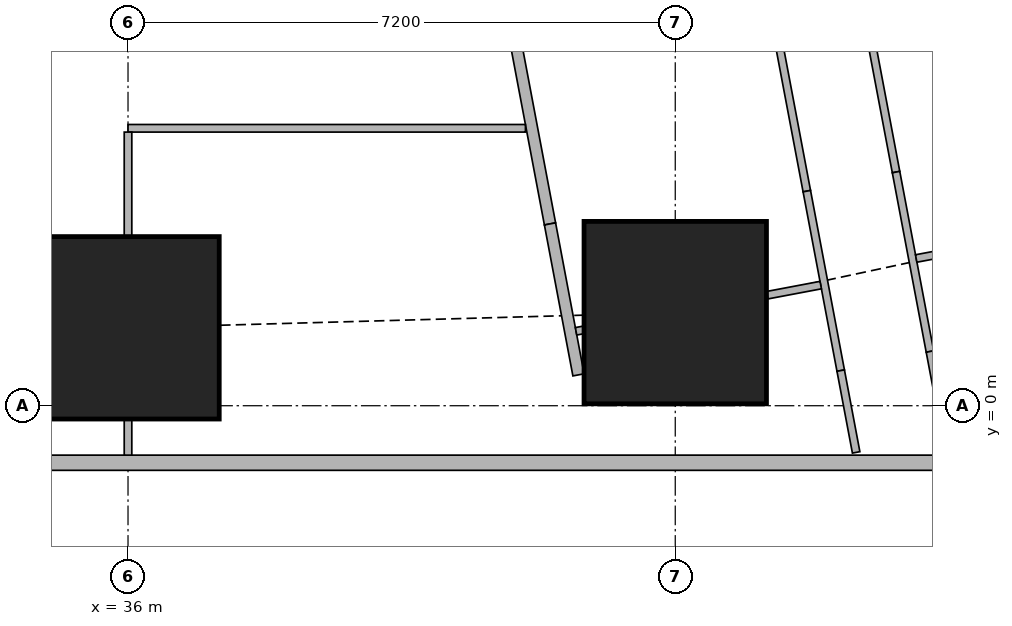
"""IFC4 building model, lengths in metres.
Left out: names, types, materials, properties, quantities, classifications, styles, units other than length and angle.
Written with IfcOpenShell. Run it as: python <this file> out.ifc"""

import sys

from ifc_helpers import new_model, si_unit, direction, frame, frame_2d, origin, origin_2d, place, context, subcontext, project, spatial, rectangle, extrude, element, fill, save


model = new_model("IFC4")
c1 = context("Model", 3, precision=1e-05, world=origin(), true_north=direction((0.0, 1.0)))
c2 = subcontext(c1, "Body", "Model", "MODEL_VIEW")
j1 = project(units=[si_unit("LENGTHUNIT", "METRE"), si_unit("PLANEANGLEUNIT", "RADIAN")], contexts=[c1])
p1 = place(None, origin())
s1 = spatial("IfcSite", under=j1, at=p1, CompositionType="ELEMENT")
p2 = place(p1, origin())
s2 = spatial("IfcBuilding", under=s1, at=p2, CompositionType="ELEMENT")
p3 = place(p2, frame((0.0, 0.0, 216.2)))
s3 = spatial("IfcBuildingStorey", under=s2, at=p3, CompositionType="ELEMENT", Elevation=216.2)
for number, where, z_axis, x_axis in (
    (1, (36.0, 1.025, 0.0), (0.0, 0.0, 1.0), (1.0, 0.0, 0.0)),
    (2, (43.2, 1.225, 0.0), (0.0, 0.0, 1.0), (1.0, 0.0, 0.0)),
):
    element("IfcColumn", number, at=place(p3, frame(where, z_axis=z_axis, x_axis=x_axis)), inside=s3, PredefinedType="COLUMN", context=c2, shape_type="SweptSolid", body=[
        extrude(rectangle(XDim=2.4, YDim=2.4, at=origin_2d()), origin(), (0.0, 0.0, 1.0), 3.75),
    ])
p4 = place(p3, frame((7.363, -0.75, 0.0), z_axis=(0.0, 0.0, 1.0), x_axis=(1.0, 0.0, 0.0)))
e3 = element("IfcWall", 3, at=p4, inside=s3, PredefinedType="SOLIDWALL", context=c2, shape_type="SweptSolid", body=[
    extrude(rectangle(XDim=40.428, YDim=0.2, at=frame_2d((20.214, 0.0))), origin(), (0.0, 0.0, 1.0), 3.5),
])
p5 = place(p4, frame((2.319, 0.0, 0.9)))
e4 = element("IfcOpeningElement", 4, at=p5, cuts=e3, PredefinedType="OPENING", context=c2, shape_type="SweptSolid", body=[
    extrude(rectangle(XDim=2.4, YDim=1.5, at=frame_2d((1.2, 0.75))), frame((0.0, 0.11, 0.0), z_axis=(0.0, -1.0, 0.0), x_axis=(1.0, 0.0, 0.0)), (0.0, 0.0, 1.0), 0.22),
])
p6 = place(p4, frame((7.937, 0.0, 0.9)))
e5 = element("IfcOpeningElement", 5, at=p6, cuts=e3, PredefinedType="OPENING", context=c2, shape_type="SweptSolid", body=[
    extrude(rectangle(XDim=1.8, YDim=1.5, at=frame_2d((0.9, 0.75))), frame((0.0, 0.11, 0.0), z_axis=(0.0, -1.0, 0.0), x_axis=(1.0, 0.0, 0.0)), (0.0, 0.0, 1.0), 0.22),
])
p7 = place(p4, frame((11.537, 0.0, 0.9)))
e6 = element("IfcOpeningElement", 6, at=p7, cuts=e3, PredefinedType="OPENING", context=c2, shape_type="SweptSolid", body=[
    extrude(rectangle(XDim=1.8, YDim=1.5, at=frame_2d((0.9, 0.75))), frame((0.0, 0.11, 0.0), z_axis=(0.0, -1.0, 0.0), x_axis=(1.0, 0.0, 0.0)), (0.0, 0.0, 1.0), 0.22),
])
p8 = place(p4, frame((15.137, 0.0, 0.9)))
e7 = element("IfcOpeningElement", 7, at=p8, cuts=e3, PredefinedType="OPENING", context=c2, shape_type="SweptSolid", body=[
    extrude(rectangle(XDim=1.8, YDim=1.5, at=frame_2d((0.9, 0.75))), frame((0.0, 0.11, 0.0), z_axis=(0.0, -1.0, 0.0), x_axis=(1.0, 0.0, 0.0)), (0.0, 0.0, 1.0), 0.22),
])
p9 = place(p4, frame((18.737, 0.0, 0.9)))
e8 = element("IfcOpeningElement", 8, at=p9, cuts=e3, PredefinedType="OPENING", context=c2, shape_type="SweptSolid", body=[
    extrude(rectangle(XDim=1.8, YDim=1.5, at=frame_2d((0.9, 0.75))), frame((0.0, 0.11, 0.0), z_axis=(0.0, -1.0, 0.0), x_axis=(1.0, 0.0, 0.0)), (0.0, 0.0, 1.0), 0.22),
])
p10 = place(p4, frame((22.337, 0.0, 0.9)))
e9 = element("IfcOpeningElement", 9, at=p10, cuts=e3, PredefinedType="OPENING", context=c2, shape_type="SweptSolid", body=[
    extrude(rectangle(XDim=1.8, YDim=1.5, at=frame_2d((0.9, 0.75))), frame((0.0, 0.11, 0.0), z_axis=(0.0, -1.0, 0.0), x_axis=(1.0, 0.0, 0.0)), (0.0, 0.0, 1.0), 0.22),
])
p11 = place(p4, frame((25.937, 0.0, 0.9)))
e10 = element("IfcOpeningElement", 10, at=p11, cuts=e3, PredefinedType="OPENING", context=c2, shape_type="SweptSolid", body=[
    extrude(rectangle(XDim=1.8, YDim=1.5, at=frame_2d((0.9, 0.75))), frame((0.0, 0.11, 0.0), z_axis=(0.0, -1.0, 0.0), x_axis=(1.0, 0.0, 0.0)), (0.0, 0.0, 1.0), 0.22),
])
p12 = place(p4, frame((29.537, 0.0, 0.9)))
e11 = element("IfcOpeningElement", 11, at=p12, cuts=e3, PredefinedType="OPENING", context=c2, shape_type="SweptSolid", body=[
    extrude(rectangle(XDim=1.8, YDim=1.5, at=frame_2d((0.9, 0.75))), frame((0.0, 0.11, 0.0), z_axis=(0.0, -1.0, 0.0), x_axis=(1.0, 0.0, 0.0)), (0.0, 0.0, 1.0), 0.22),
])
p13 = place(p4, frame((33.137, 0.0, 0.9)))
e12 = element("IfcOpeningElement", 12, at=p13, cuts=e3, PredefinedType="OPENING", context=c2, shape_type="SweptSolid", body=[
    extrude(rectangle(XDim=1.8, YDim=1.5, at=frame_2d((0.9, 0.75))), frame((0.0, 0.11, 0.0), z_axis=(0.0, -1.0, 0.0), x_axis=(1.0, 0.0, 0.0)), (0.0, 0.0, 1.0), 0.22),
])
p14 = place(p3, frame((50.653, 2.703, 0.0), z_axis=(0.0, 0.0, 1.0), x_axis=(-0.185612026696, 0.982623109613, 0.0)))
e13 = element("IfcWall", 13, at=p14, inside=s3, PredefinedType="SOLIDWALL", context=c2, shape_type="SweptSolid", body=[
    extrude(rectangle(XDim=41.393, YDim=0.2, at=frame_2d((20.697, 0.0))), origin(), (0.0, 0.0, 1.0), 3.5),
])
p15 = place(p14, frame((1.633, 0.0, 0.9)))
e14 = element("IfcOpeningElement", 14, at=p15, cuts=e13, PredefinedType="OPENING", context=c2, shape_type="SweptSolid", body=[
    extrude(rectangle(XDim=1.8, YDim=1.5, at=frame_2d((0.9, 0.75))), frame((0.0, 0.11, 0.0), z_axis=(0.0, -1.0, 0.0), x_axis=(1.0, 0.0, 0.0)), (0.0, 0.0, 1.0), 0.22),
])
p16 = place(p14, frame((6.032, 0.0, 0.9)))
e15 = element("IfcOpeningElement", 15, at=p16, cuts=e13, PredefinedType="OPENING", context=c2, shape_type="SweptSolid", body=[
    extrude(rectangle(XDim=1.8, YDim=1.5, at=frame_2d((0.9, 0.75))), frame((0.0, 0.11, 0.0), z_axis=(0.0, -1.0, 0.0), x_axis=(1.0, 0.0, 0.0)), (0.0, 0.0, 1.0), 0.22),
])
p17 = place(p14, frame((9.848, 0.0, 0.9)))
e16 = element("IfcOpeningElement", 16, at=p17, cuts=e13, PredefinedType="OPENING", context=c2, shape_type="SweptSolid", body=[
    extrude(rectangle(XDim=1.8, YDim=1.5, at=frame_2d((0.9, 0.75))), frame((0.0, 0.11, 0.0), z_axis=(0.0, -1.0, 0.0), x_axis=(1.0, 0.0, 0.0)), (0.0, 0.0, 1.0), 0.22),
])
p18 = place(p14, frame((13.664, 0.0, 0.9)))
e17 = element("IfcOpeningElement", 17, at=p18, cuts=e13, PredefinedType="OPENING", context=c2, shape_type="SweptSolid", body=[
    extrude(rectangle(XDim=1.8, YDim=1.5, at=frame_2d((0.9, 0.75))), frame((0.0, 0.11, 0.0), z_axis=(0.0, -1.0, 0.0), x_axis=(1.0, 0.0, 0.0)), (0.0, 0.0, 1.0), 0.22),
])
p19 = place(p14, frame((17.481, 0.0, 0.9)))
e18 = element("IfcOpeningElement", 18, at=p19, cuts=e13, PredefinedType="OPENING", context=c2, shape_type="SweptSolid", body=[
    extrude(rectangle(XDim=1.8, YDim=1.5, at=frame_2d((0.9, 0.75))), frame((0.0, 0.11, 0.0), z_axis=(0.0, -1.0, 0.0), x_axis=(1.0, 0.0, 0.0)), (0.0, 0.0, 1.0), 0.22),
])
p20 = place(p14, frame((21.297, 0.0, 0.9)))
e19 = element("IfcOpeningElement", 19, at=p20, cuts=e13, PredefinedType="OPENING", context=c2, shape_type="SweptSolid", body=[
    extrude(rectangle(XDim=1.8, YDim=1.5, at=frame_2d((0.9, 0.75))), frame((0.0, 0.11, 0.0), z_axis=(0.0, -1.0, 0.0), x_axis=(1.0, 0.0, 0.0)), (0.0, 0.0, 1.0), 0.22),
])
p21 = place(p14, frame((25.113, 0.0, 0.9)))
e20 = element("IfcOpeningElement", 20, at=p21, cuts=e13, PredefinedType="OPENING", context=c2, shape_type="SweptSolid", body=[
    extrude(rectangle(XDim=1.8, YDim=1.5, at=frame_2d((0.9, 0.75))), frame((0.0, 0.11, 0.0), z_axis=(0.0, -1.0, 0.0), x_axis=(1.0, 0.0, 0.0)), (0.0, 0.0, 1.0), 0.22),
])
p22 = place(p14, frame((28.93, 0.0, 0.9)))
e21 = element("IfcOpeningElement", 21, at=p22, cuts=e13, PredefinedType="OPENING", context=c2, shape_type="SweptSolid", body=[
    extrude(rectangle(XDim=1.8, YDim=1.5, at=frame_2d((0.9, 0.75))), frame((0.0, 0.11, 0.0), z_axis=(0.0, -1.0, 0.0), x_axis=(1.0, 0.0, 0.0)), (0.0, 0.0, 1.0), 0.22),
])
p23 = place(p14, frame((32.746, 0.0, 0.9)))
e22 = element("IfcOpeningElement", 22, at=p23, cuts=e13, PredefinedType="OPENING", context=c2, shape_type="SweptSolid", body=[
    extrude(rectangle(XDim=1.8, YDim=1.5, at=frame_2d((0.9, 0.75))), frame((0.0, 0.11, 0.0), z_axis=(0.0, -1.0, 0.0), x_axis=(1.0, 0.0, 0.0)), (0.0, 0.0, 1.0), 0.22),
])
p24 = place(p14, frame((36.481, 0.0, 0.9)))
e23 = element("IfcOpeningElement", 23, at=p24, cuts=e13, PredefinedType="OPENING", context=c2, shape_type="SweptSolid", body=[
    extrude(rectangle(XDim=1.8, YDim=1.5, at=frame_2d((0.9, 0.75))), frame((0.0, 0.11, 0.0), z_axis=(0.0, -1.0, 0.0), x_axis=(1.0, 0.0, 0.0)), (0.0, 0.0, 1.0), 0.22),
])
p25 = place(p3, frame((33.933, 42.73, 0.0), z_axis=(0.0, 0.0, 1.0), x_axis=(0.185595417643, -0.982626246825, 0.0)))
e24 = element("IfcWall", 24, at=p25, inside=s3, PredefinedType="SOLIDWALL", context=c2, shape_type="SweptSolid", body=[
    extrude(rectangle(XDim=41.051, YDim=0.15, at=frame_2d((20.525, 0.0))), origin(), (0.0, 0.0, 1.0), 2.5),
])
p26 = place(p25, frame((12.266, 0.0, 0.0)))
e25 = element("IfcOpeningElement", 25, at=p26, cuts=e24, PredefinedType="OPENING", context=c2, shape_type="SweptSolid", body=[
    extrude(rectangle(XDim=1.0, YDim=2.1, at=frame_2d((0.5, 1.05))), frame((0.0, 0.085, 0.0), z_axis=(0.0, -1.0, 0.0), x_axis=(1.0, 0.0, 0.0)), (0.0, 0.0, 1.0), 0.17),
])
p27 = place(p25, frame((16.082, 0.0, 0.0)))
e26 = element("IfcOpeningElement", 26, at=p27, cuts=e24, PredefinedType="OPENING", context=c2, shape_type="SweptSolid", body=[
    extrude(rectangle(XDim=1.0, YDim=2.1, at=frame_2d((0.5, 1.05))), frame((0.0, 0.085, 0.0), z_axis=(0.0, -1.0, 0.0), x_axis=(1.0, 0.0, 0.0)), (0.0, 0.0, 1.0), 0.17),
])
p28 = place(p25, frame((24.369, 0.0, 0.0)))
e27 = element("IfcOpeningElement", 27, at=p28, cuts=e24, PredefinedType="OPENING", context=c2, shape_type="SweptSolid", body=[
    extrude(rectangle(XDim=1.0, YDim=2.1, at=frame_2d((0.5, 1.05))), frame((0.0, 0.085, 0.0), z_axis=(0.0, -1.0, 0.0), x_axis=(1.0, 0.0, 0.0)), (0.0, 0.0, 1.0), 0.17),
])
p29 = place(p25, frame((30.862, 0.0, 0.0)))
e28 = element("IfcOpeningElement", 28, at=p29, cuts=e24, PredefinedType="OPENING", context=c2, shape_type="SweptSolid", body=[
    extrude(rectangle(XDim=1.0, YDim=2.1, at=frame_2d((0.5, 1.05))), frame((0.0, 0.085, 0.0), z_axis=(0.0, -1.0, 0.0), x_axis=(1.0, 0.0, 0.0)), (0.0, 0.0, 1.0), 0.17),
])
p30 = place(p3, frame((41.552, 2.392, 0.0), z_axis=(0.0, 0.0, 1.0), x_axis=(0.185535500323, -0.982637561932, 0.0)))
e29 = element("IfcWall", 29, at=p30, inside=s3, PredefinedType="SOLIDWALL", context=c2, shape_type="SweptSolid", body=[
    extrude(rectangle(XDim=2.021, YDim=0.15, at=frame_2d((1.011, 0.0))), origin(), (0.0, 0.0, 1.0), 2.05),
])
p31 = place(p3, frame((41.229, 3.65, 0.0), z_axis=(0.0, 0.0, 1.0), x_axis=(-1.0, 0.0, 0.0)))
e30 = element("IfcWall", 30, at=p31, inside=s3, PredefinedType="PARTITIONING", context=c2, shape_type="SweptSolid", body=[
    extrude(rectangle(XDim=5.229, YDim=0.1, at=frame_2d((2.615, 0.0))), origin(), (0.0, 0.0, 1.0), 3.5),
])
p32 = place(p31, frame((4.129, 0.0, 0.0)))
e31 = element("IfcOpeningElement", 31, at=p32, cuts=e30, PredefinedType="OPENING", context=c2, shape_type="SweptSolid", body=[
    extrude(rectangle(XDim=0.9, YDim=2.1, at=frame_2d((0.45, 1.05))), frame((0.0, 0.06, 0.0), z_axis=(0.0, -1.0, 0.0), x_axis=(1.0, 0.0, 0.0)), (0.0, 0.0, 1.0), 0.12),
])
p33 = place(p3, frame((36.0, -0.65, 0.0), z_axis=(0.0, 0.0, 1.0), x_axis=(0.0, 1.0, 0.0)))
e32 = element("IfcWall", 32, at=p33, inside=s3, PredefinedType="PARTITIONING", context=c2, shape_type="SweptSolid", body=[
    extrude(rectangle(XDim=0.474, YDim=0.1, at=frame_2d((0.237, 0.0))), origin(), (0.0, 0.0, 1.0), 3.5),
])
p34 = place(p3, frame((36.0, 2.226, 0.0), z_axis=(0.0, 0.0, 1.0), x_axis=(0.0, 1.0, 0.0)))
e33 = element("IfcWall", 33, at=p34, inside=s3, PredefinedType="PARTITIONING", context=c2, shape_type="SweptSolid", body=[
    extrude(rectangle(XDim=1.374, YDim=0.1, at=frame_2d((0.687, 0.0))), origin(), (0.0, 0.0, 1.0), 3.5),
])
p35 = place(p3, frame((44.727, 10.366, 0.0), z_axis=(0.0, 0.0, 1.0), x_axis=(0.185678775129, -0.982610498858, 0.0)))
e34 = element("IfcWall", 34, at=p35, inside=s3, PredefinedType="PARTITIONING", context=c2, shape_type="SweptSolid", body=[
    extrude(rectangle(XDim=7.421, YDim=0.1, at=frame_2d((3.71, 0.0))), origin(), (0.0, 0.0, 1.0), 3.5),
])
p36 = place(p35, frame((0.151, 0.0, 0.0)))
e35 = element("IfcOpeningElement", 35, at=p36, cuts=e34, PredefinedType="OPENING", context=c2, shape_type="SweptSolid", body=[
    extrude(rectangle(XDim=0.9, YDim=2.1, at=frame_2d((0.45, 1.05))), frame((0.0, 0.06, 0.0), z_axis=(0.0, -1.0, 0.0), x_axis=(1.0, 0.0, 0.0)), (0.0, 0.0, 1.0), 0.12),
])
p37 = place(p35, frame((4.65, 0.0, 0.0)))
e36 = element("IfcOpeningElement", 36, at=p37, cuts=e34, PredefinedType="OPENING", context=c2, shape_type="SweptSolid", body=[
    extrude(rectangle(XDim=0.9, YDim=2.1, at=frame_2d((0.45, 1.05))), frame((0.0, 0.06, 0.0), z_axis=(0.0, -1.0, 0.0), x_axis=(1.0, 0.0, 0.0)), (0.0, 0.0, 1.0), 0.12),
])
p38 = place(p3, frame((46.105, 3.074, 0.0), z_axis=(0.0, 0.0, 1.0), x_axis=(0.185631845838, -0.982619365681, 0.0)))
e37 = element("IfcWall", 37, at=p38, inside=s3, PredefinedType="PARTITIONING", context=c2, shape_type="SweptSolid", body=[
    extrude(rectangle(XDim=2.403, YDim=0.1, at=frame_2d((1.201, 0.0))), origin(), (0.0, 0.0, 1.0), 2.05),
])
p39 = place(p3, frame((46.551, 0.713, 0.0), z_axis=(0.0, 0.0, 1.0), x_axis=(0.185407859198, -0.982661653748, 0.0)))
e38 = element("IfcWall", 38, at=p39, inside=s3, PredefinedType="PARTITIONING", context=c2, shape_type="SweptSolid", body=[
    extrude(rectangle(XDim=1.343, YDim=0.1, at=frame_2d((0.671, 0.0))), origin(), (0.0, 0.0, 1.0), 3.5),
])
p40 = place(p3, frame((43.949, 8.02, 0.0), z_axis=(0.0, 0.0, 1.0), x_axis=(0.185656792073, -0.982614652627, 0.0)))
e39 = element("IfcWall", 39, at=p40, inside=s3, PredefinedType="PARTITIONING", context=c2, shape_type="SweptSolid", body=[
    extrude(rectangle(XDim=5.289, YDim=0.1, at=frame_2d((2.645, 0.0))), origin(), (0.0, 0.0, 1.0), 3.5),
])
p41 = place(p40, frame((1.2, 0.0, 0.0)))
e40 = element("IfcOpeningElement", 40, at=p41, cuts=e39, PredefinedType="OPENING", context=c2, shape_type="SweptSolid", body=[
    extrude(rectangle(XDim=0.9, YDim=2.1, at=frame_2d((0.45, 1.05))), frame((0.0, 0.06, 0.0), z_axis=(0.0, -1.0, 0.0), x_axis=(1.0, 0.0, 0.0)), (0.0, 0.0, 1.0), 0.12),
])
p42 = place(p40, frame((2.935, 0.0, 0.0)))
e41 = element("IfcOpeningElement", 41, at=p42, cuts=e39, PredefinedType="OPENING", context=c2, shape_type="SweptSolid", body=[
    extrude(rectangle(XDim=0.9, YDim=2.1, at=frame_2d((0.45, 1.05))), frame((0.0, 0.06, 0.0), z_axis=(0.0, -1.0, 0.0), x_axis=(1.0, 0.0, 0.0)), (0.0, 0.0, 1.0), 0.12),
])
p43 = place(p3, frame((44.931, 2.823, 0.0), z_axis=(0.0, 0.0, 1.0), x_axis=(0.185631845838, -0.982619365681, 0.0)))
e42 = element("IfcWall", 42, at=p43, inside=s3, PredefinedType="PARTITIONING", context=c2, shape_type="SweptSolid", body=[
    extrude(rectangle(XDim=2.403, YDim=0.1, at=frame_2d((1.201, 0.0))), origin(), (0.0, 0.0, 1.0), 2.05),
])
p44 = place(p3, frame((45.377, 0.462, 0.0), z_axis=(0.0, 0.0, 1.0), x_axis=(0.185513480919, -0.982641719243, 0.0)))
e43 = element("IfcWall", 43, at=p44, inside=s3, PredefinedType="PARTITIONING", context=c2, shape_type="SweptSolid", body=[
    extrude(rectangle(XDim=1.095, YDim=0.1, at=frame_2d((0.547, 0.0))), origin(), (0.0, 0.0, 1.0), 3.5),
])
p45 = place(p3, frame((46.738, 2.006, 0.0), z_axis=(0.0, 0.0, 1.0), x_axis=(-0.982820466874, -0.184564161994, 0.0)))
e44 = element("IfcWall", 44, at=p45, inside=s3, PredefinedType="PARTITIONING", context=c2, shape_type="SweptSolid", body=[
    extrude(rectangle(XDim=0.374, YDim=0.1, at=frame_2d((0.187, 0.0))), origin(), (0.0, 0.0, 1.0), 2.05),
])
p46 = place(p3, frame((45.114, 1.587, 0.0), z_axis=(0.0, 0.0, 1.0), x_axis=(-0.982671022916, -0.185358195723, 0.0)))
e45 = element("IfcWall", 45, at=p46, inside=s3, PredefinedType="PARTITIONING", context=c2, shape_type="SweptSolid", body=[
    extrude(rectangle(XDim=0.717, YDim=0.1, at=frame_2d((0.358, 0.0))), origin(), (0.0, 0.0, 1.0), 2.05),
])
p47 = place(p3, frame((41.99, 0.997, 0.0), z_axis=(0.0, 0.0, 1.0), x_axis=(-0.982382747416, -0.186880008506, 0.0)))
e46 = element("IfcWall", 46, at=p47, inside=s3, PredefinedType="PARTITIONING", context=c2, shape_type="SweptSolid", body=[
    extrude(rectangle(XDim=0.097, YDim=0.1, at=frame_2d((0.048, 0.0))), origin(), (0.0, 0.0, 1.0), 2.05),
])
p48 = place(p11, origin())
e47 = element("IfcWindow", 47, at=p48, inside=s3, PartitioningType="SINGLE_PANEL", PredefinedType="WINDOW", context=c2, shape_type="SweptSolid", body=[
    extrude(rectangle(XDim=1.8, YDim=1.5, at=frame_2d((0.9, 0.75))), frame((0.0, 0.03, 0.0), z_axis=(0.0, -1.0, 0.0), x_axis=(1.0, 0.0, 0.0)), (0.0, 0.0, 1.0), 0.06),
])
fill(e10, e47)
p49 = place(p12, origin())
e48 = element("IfcWindow", 48, at=p49, inside=s3, PartitioningType="SINGLE_PANEL", PredefinedType="WINDOW", context=c2, shape_type="SweptSolid", body=[
    extrude(rectangle(XDim=1.8, YDim=1.5, at=frame_2d((0.9, 0.75))), frame((0.0, 0.03, 0.0), z_axis=(0.0, -1.0, 0.0), x_axis=(1.0, 0.0, 0.0)), (0.0, 0.0, 1.0), 0.06),
])
fill(e11, e48)
p50 = place(p13, origin())
e49 = element("IfcWindow", 49, at=p50, inside=s3, PartitioningType="SINGLE_PANEL", PredefinedType="WINDOW", context=c2, shape_type="SweptSolid", body=[
    extrude(rectangle(XDim=1.8, YDim=1.5, at=frame_2d((0.9, 0.75))), frame((0.0, 0.03, 0.0), z_axis=(0.0, -1.0, 0.0), x_axis=(1.0, 0.0, 0.0)), (0.0, 0.0, 1.0), 0.06),
])
fill(e12, e49)
p51 = place(p32, origin())
e50 = element("IfcDoor", 50, at=p51, inside=s3, OperationType="SINGLE_SWING_LEFT", PredefinedType="DOOR", context=c2, shape_type="SweptSolid", body=[
    extrude(rectangle(XDim=0.9, YDim=2.1, at=frame_2d((0.45, 1.05))), frame((0.0, 0.025, 0.0), z_axis=(0.0, -1.0, 0.0), x_axis=(1.0, 0.0, 0.0)), (0.0, 0.0, 1.0), 0.05),
])
fill(e31, e50)
p52 = place(p42, origin())
e51 = element("IfcDoor", 51, at=p52, inside=s3, OperationType="SINGLE_SWING_RIGHT", PredefinedType="DOOR", context=c2, shape_type="SweptSolid", body=[
    extrude(rectangle(XDim=0.9, YDim=2.1, at=frame_2d((0.45, 1.05))), frame((0.0, 0.025, 0.0), z_axis=(0.0, -1.0, 0.0), x_axis=(1.0, 0.0, 0.0)), (0.0, 0.0, 1.0), 0.05),
])
fill(e41, e51)
save(model, sys.argv[1])
